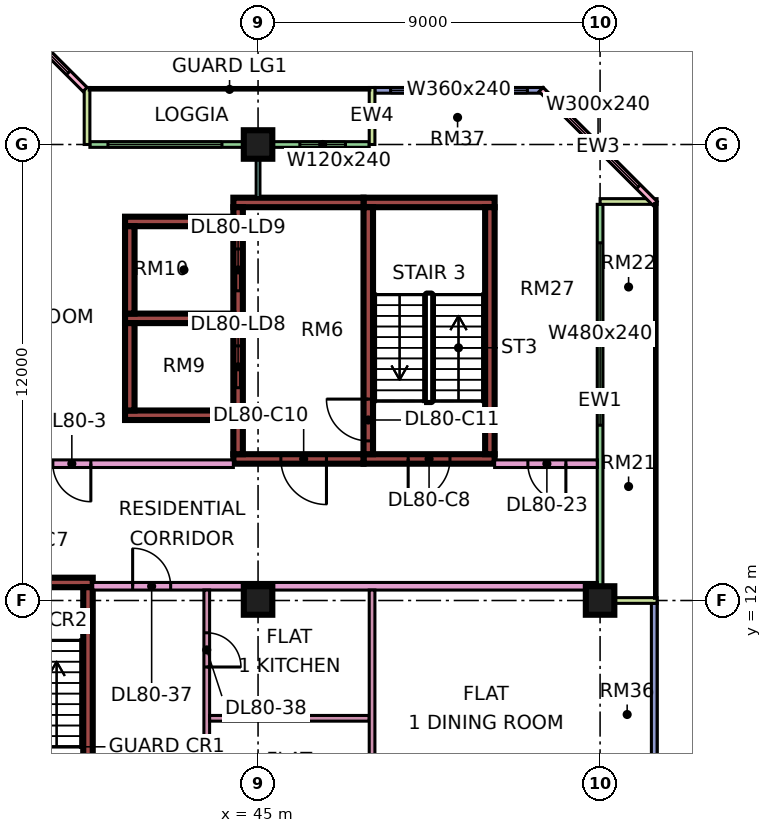
"""IFC4 building model, lengths in metres.
Left out: names, types, materials, properties, quantities, classifications, styles, units other than length and angle.
Written with IfcOpenShell. Run it as: python <this file> out.ifc"""

import sys

from ifc_helpers import new_model, si_unit, direction, frame, frame_2d, origin, origin_2d, place, context, subcontext, project, spatial, rectangle, extrude, element, fill, save


model = new_model("IFC4")
c1 = context("Model", 3, precision=1e-05, world=origin(), true_north=direction((0.0, 1.0)))
c2 = subcontext(c1, "Body", "Model", "MODEL_VIEW")
j1 = project(units=[si_unit("LENGTHUNIT", "METRE"), si_unit("PLANEANGLEUNIT", "RADIAN")], contexts=[c1])
p1 = place(None, origin())
s1 = spatial("IfcSite", under=j1, at=p1, CompositionType="ELEMENT")
p2 = place(p1, origin())
s2 = spatial("IfcBuilding", under=s1, at=p2, CompositionType="ELEMENT")
p3 = place(p2, frame((0.0, 0.0, 346.4)))
s3 = spatial("IfcBuildingStorey", under=s2, at=p3, CompositionType="ELEMENT", Elevation=346.4)
for number, where, z_axis, x_axis in (
    (1, (45.0, 12.0, 0.0), (0.0, 0.0, 1.0), (1.0, 0.0, 0.0)),
    (2, (45.0, 24.0, 0.0), (0.0, 0.0, 1.0), (1.0, 0.0, 0.0)),
    (3, (54.0, 12.0, 0.0), (0.0, 0.0, 1.0), (1.0, 0.0, 0.0)),
):
    element("IfcColumn", number, at=place(p3, frame(where, z_axis=z_axis, x_axis=x_axis)), inside=s3, PredefinedType="COLUMN", context=c2, shape_type="SweptSolid", body=[
        extrude(rectangle(XDim=0.75, YDim=0.75, at=origin_2d()), origin(), (0.0, 0.0, 1.0), 3.75),
    ])
p4 = place(p3, frame((36.375, 12.475, 0.0), z_axis=(0.0, 0.0, 1.0), x_axis=(1.0, 0.0, 0.0)))
e4 = element("IfcWall", 4, at=p4, inside=s3, PredefinedType="SHEAR", context=c2, shape_type="SweptSolid", body=[
    extrude(rectangle(XDim=4.275, YDim=0.25, at=frame_2d((2.137, 0.0))), origin(), (0.0, 0.0, 1.0), 3.75),
])
p5 = place(p4, frame((2.0, 0.0, 0.0)))
e5 = element("IfcOpeningElement", 5, at=p5, cuts=e4, PredefinedType="OPENING", context=c2, shape_type="SweptSolid", body=[
    extrude(rectangle(XDim=1.1, YDim=2.2, at=frame_2d((0.55, 1.1))), frame((0.0, 0.135, 0.0), z_axis=(0.0, -1.0, 0.0), x_axis=(1.0, 0.0, 0.0)), (0.0, 0.0, 1.0), 0.27),
])
p6 = place(p3, frame((40.525, 5.85, 0.0), z_axis=(0.0, 0.0, 1.0), x_axis=(0.0, 1.0, 0.0)))
e6 = element("IfcWall", 6, at=p6, inside=s3, PredefinedType="SHEAR", context=c2, shape_type="SweptSolid", body=[
    extrude(rectangle(XDim=6.5, YDim=0.25, at=frame_2d((3.25, 0.0))), origin(), (0.0, 0.0, 1.0), 3.75),
])
p7 = place(p3, frame((47.775, 15.725, 0.0), z_axis=(0.0, 0.0, 1.0), x_axis=(1.0, 0.0, 0.0)))
e7 = element("IfcWall", 7, at=p7, inside=s3, PredefinedType="SHEAR", context=c2, shape_type="SweptSolid", body=[
    extrude(rectangle(XDim=3.45, YDim=0.25, at=frame_2d((1.725, 0.0))), origin(), (0.0, 0.0, 1.0), 3.75),
])
p8 = place(p7, frame((1.175, 0.0, 0.0)))
e8 = element("IfcOpeningElement", 8, at=p8, cuts=e7, PredefinedType="OPENING", context=c2, shape_type="SweptSolid", body=[
    extrude(rectangle(XDim=1.1, YDim=2.2, at=frame_2d((0.55, 1.1))), frame((0.0, 0.135, 0.0), z_axis=(0.0, -1.0, 0.0), x_axis=(1.0, 0.0, 0.0)), (0.0, 0.0, 1.0), 0.27),
])
p9 = place(p3, frame((47.775, 22.475, 0.0), z_axis=(0.0, 0.0, 1.0), x_axis=(1.0, 0.0, 0.0)))
e9 = element("IfcWall", 9, at=p9, inside=s3, PredefinedType="SHEAR", context=c2, shape_type="SweptSolid", body=[
    extrude(rectangle(XDim=3.45, YDim=0.25, at=frame_2d((1.725, 0.0))), origin(), (0.0, 0.0, 1.0), 3.75),
])
p10 = place(p3, frame((47.9, 15.85, 0.0), z_axis=(0.0, 0.0, 1.0), x_axis=(0.0, 1.0, 0.0)))
e10 = element("IfcWall", 10, at=p10, inside=s3, PredefinedType="SHEAR", context=c2, shape_type="SweptSolid", body=[
    extrude(rectangle(XDim=6.5, YDim=0.25, at=frame_2d((3.25, 0.0))), origin(), (0.0, 0.0, 1.0), 3.75),
])
p11 = place(p10, frame((0.35, 0.0, 0.0)))
e11 = element("IfcOpeningElement", 11, at=p11, cuts=e10, PredefinedType="OPENING", context=c2, shape_type="SweptSolid", body=[
    extrude(rectangle(XDim=1.1, YDim=2.2, at=frame_2d((0.55, 1.1))), frame((0.0, 0.135, 0.0), z_axis=(0.0, -1.0, 0.0), x_axis=(1.0, 0.0, 0.0)), (0.0, 0.0, 1.0), 0.27),
])
p12 = place(p3, frame((51.1, 15.85, 0.0), z_axis=(0.0, 0.0, 1.0), x_axis=(0.0, 1.0, 0.0)))
e12 = element("IfcWall", 12, at=p12, inside=s3, PredefinedType="SHEAR", context=c2, shape_type="SweptSolid", body=[
    extrude(rectangle(XDim=6.5, YDim=0.25, at=frame_2d((3.25, 0.0))), origin(), (0.0, 0.0, 1.0), 3.75),
])
p13 = place(p3, frame((44.35, 15.725, 0.0), z_axis=(0.0, 0.0, 1.0), x_axis=(1.0, 0.0, 0.0)))
e13 = element("IfcWall", 13, at=p13, inside=s3, PredefinedType="SHEAR", context=c2, shape_type="SweptSolid", body=[
    extrude(rectangle(XDim=3.425, YDim=0.25, at=frame_2d((1.712, 0.0))), origin(), (0.0, 0.0, 1.0), 3.75),
])
p14 = place(p13, frame((1.25, 0.0, 0.0)))
e14 = element("IfcOpeningElement", 14, at=p14, cuts=e13, PredefinedType="OPENING", context=c2, shape_type="SweptSolid", body=[
    extrude(rectangle(XDim=1.2, YDim=2.2, at=frame_2d((0.6, 1.1))), frame((0.0, 0.135, 0.0), z_axis=(0.0, -1.0, 0.0), x_axis=(1.0, 0.0, 0.0)), (0.0, 0.0, 1.0), 0.27),
])
p15 = place(p3, frame((44.35, 22.475, 0.0), z_axis=(0.0, 0.0, 1.0), x_axis=(1.0, 0.0, 0.0)))
e15 = element("IfcWall", 15, at=p15, inside=s3, PredefinedType="SHEAR", context=c2, shape_type="SweptSolid", body=[
    extrude(rectangle(XDim=3.425, YDim=0.25, at=frame_2d((1.712, 0.0))), origin(), (0.0, 0.0, 1.0), 3.75),
])
p16 = place(p3, frame((44.475, 15.85, 0.0), z_axis=(0.0, 0.0, 1.0), x_axis=(0.0, 1.0, 0.0)))
e16 = element("IfcWall", 16, at=p16, inside=s3, PredefinedType="SHEAR", context=c2, shape_type="SweptSolid", body=[
    extrude(rectangle(XDim=6.5, YDim=0.25, at=frame_2d((3.25, 0.0))), origin(), (0.0, 0.0, 1.0), 3.75),
])
p17 = place(p16, frame((1.75, 0.0, 0.0)))
e17 = element("IfcOpeningElement", 17, at=p17, cuts=e16, PredefinedType="OPENING", context=c2, shape_type="SweptSolid", body=[
    extrude(rectangle(XDim=1.1, YDim=2.2, at=frame_2d((0.55, 1.1))), frame((0.0, 0.135, 0.0), z_axis=(0.0, -1.0, 0.0), x_axis=(1.0, 0.0, 0.0)), (0.0, 0.0, 1.0), 0.27),
])
p18 = place(p16, frame((4.3, 0.0, 0.0)))
e18 = element("IfcOpeningElement", 18, at=p18, cuts=e16, PredefinedType="OPENING", context=c2, shape_type="SweptSolid", body=[
    extrude(rectangle(XDim=1.1, YDim=2.2, at=frame_2d((0.55, 1.1))), frame((0.0, 0.135, 0.0), z_axis=(0.0, -1.0, 0.0), x_axis=(1.0, 0.0, 0.0)), (0.0, 0.0, 1.0), 0.27),
])
for number, where, z_axis, x_axis in (
    (19, (41.5, 16.875, 0.0), (0.0, 0.0, 1.0), (1.0, 0.0, 0.0)),
    (20, (41.5, 19.425, 0.0), (0.0, 0.0, 1.0), (1.0, 0.0, 0.0)),
    (21, (41.5, 21.975, 0.0), (0.0, 0.0, 1.0), (1.0, 0.0, 0.0)),
):
    element("IfcWall", number, at=place(p3, frame(where, z_axis=z_axis, x_axis=x_axis)), inside=s3, PredefinedType="SHEAR", context=c2, shape_type="SweptSolid", body=[
        extrude(rectangle(XDim=2.85, YDim=0.25, at=frame_2d((1.425, 0.0))), origin(), (0.0, 0.0, 1.0), 3.75),
    ])
for number, where, z_axis, x_axis in (
    (22, (41.625, 17.0, 0.0), (0.0, 0.0, 1.0), (0.0, 1.0, 0.0)),
    (23, (41.625, 19.55, 0.0), (0.0, 0.0, 1.0), (0.0, 1.0, 0.0)),
):
    element("IfcWall", number, at=place(p3, frame(where, z_axis=z_axis, x_axis=x_axis)), inside=s3, PredefinedType="SHEAR", context=c2, shape_type="SweptSolid", body=[
        extrude(rectangle(XDim=2.3, YDim=0.25, at=frame_2d((1.15, 0.0))), origin(), (0.0, 0.0, 1.0), 3.75),
    ])
p19 = place(p3, frame((52.5, 25.425, 0.0), z_axis=(0.0, 0.0, 1.0), x_axis=(-1.0, 0.0, 0.0)))
e24 = element("IfcWall", 24, at=p19, inside=s3, PredefinedType="SOLIDWALL", context=c2, shape_type="SweptSolid", body=[
    extrude(rectangle(XDim=4.425, YDim=0.15, at=frame_2d((2.212, 0.0))), origin(), (0.0, 0.0, 1.0), 3.35),
])
p20 = place(p19, frame((0.413, 0.0, 0.45)))
e25 = element("IfcOpeningElement", 25, at=p20, cuts=e24, PredefinedType="OPENING", context=c2, shape_type="SweptSolid", body=[
    extrude(rectangle(XDim=3.6, YDim=2.4, at=frame_2d((1.8, 1.2))), frame((0.0, 0.085, 0.0), z_axis=(0.0, -1.0, 0.0), x_axis=(1.0, 0.0, 0.0)), (0.0, 0.0, 1.0), 0.17),
])
p21 = place(p3, frame((47.925, 24.0, 0.0), z_axis=(0.0, 0.0, 1.0), x_axis=(-1.0, 0.0, 0.0)))
e26 = element("IfcWall", 26, at=p21, inside=s3, PredefinedType="SOLIDWALL", context=c2, shape_type="SweptSolid", body=[
    extrude(rectangle(XDim=7.35, YDim=0.15, at=frame_2d((3.675, 0.0))), origin(), (0.0, 0.0, 1.0), 3.35),
])
p22 = place(p21, frame((0.625, 0.0, 0.45)))
e27 = element("IfcOpeningElement", 27, at=p22, cuts=e26, PredefinedType="OPENING", context=c2, shape_type="SweptSolid", body=[
    extrude(rectangle(XDim=1.2, YDim=2.4, at=frame_2d((0.6, 1.2))), frame((0.0, 0.085, 0.0), z_axis=(0.0, -1.0, 0.0), x_axis=(1.0, 0.0, 0.0)), (0.0, 0.0, 1.0), 0.17),
])
p23 = place(p21, frame((3.875, 0.0, 0.45)))
e28 = element("IfcOpeningElement", 28, at=p23, cuts=e26, PredefinedType="OPENING", context=c2, shape_type="SweptSolid", body=[
    extrude(rectangle(XDim=3.0, YDim=2.4, at=frame_2d((1.5, 1.2))), frame((0.0, 0.085, 0.0), z_axis=(0.0, -1.0, 0.0), x_axis=(1.0, 0.0, 0.0)), (0.0, 0.0, 1.0), 0.17),
])
for number, where, z_axis, x_axis in (
    (29, (48.0, 25.5, 0.0), (0.0, 0.0, 1.0), (0.0, -1.0, 0.0)),
    (30, (40.5, 25.5, 0.0), (0.0, 0.0, 1.0), (0.0, -1.0, 0.0)),
):
    element("IfcWall", number, at=place(p3, frame(where, z_axis=z_axis, x_axis=x_axis)), inside=s3, PredefinedType="SOLIDWALL", context=c2, shape_type="SweptSolid", body=[
        extrude(rectangle(XDim=1.5, YDim=0.15, at=frame_2d((0.75, 0.0))), origin(), (0.0, 0.0, 1.0), 3.35),
    ])
p24 = place(p3, frame((40.447, 25.447, 0.0), z_axis=(0.0, 0.0, 1.0), x_axis=(-0.707106781187, 0.707106781187, 0.0)))
e31 = element("IfcWall", 31, at=p24, inside=s3, PredefinedType="SOLIDWALL", context=c2, shape_type="SweptSolid", body=[
    extrude(rectangle(XDim=4.243, YDim=0.15, at=frame_2d((2.121, 0.0))), origin(), (0.0, 0.0, 1.0), 3.35),
])
p25 = place(p24, frame((0.621, 0.0, 0.45)))
e32 = element("IfcOpeningElement", 32, at=p25, cuts=e31, PredefinedType="OPENING", context=c2, shape_type="SweptSolid", body=[
    extrude(rectangle(XDim=3.0, YDim=2.4, at=frame_2d((1.5, 1.2))), frame((0.0, 0.085, 0.0), z_axis=(0.0, -1.0, 0.0), x_axis=(1.0, 0.0, 0.0)), (0.0, 0.0, 1.0), 0.17),
])
p26 = place(p3, frame((55.425, 1.5, 0.0), z_axis=(0.0, 0.0, 1.0), x_axis=(0.0, 1.0, 0.0)))
e33 = element("IfcWall", 33, at=p26, inside=s3, PredefinedType="SOLIDWALL", context=c2, shape_type="SweptSolid", body=[
    extrude(rectangle(XDim=10.425, YDim=0.15, at=frame_2d((5.212, 0.0))), origin(), (0.0, 0.0, 1.0), 3.35),
])
p27 = place(p26, frame((0.4, 0.0, 0.45)))
e34 = element("IfcOpeningElement", 34, at=p27, cuts=e33, PredefinedType="OPENING", context=c2, shape_type="SweptSolid", body=[
    extrude(rectangle(XDim=2.4, YDim=2.4, at=frame_2d((1.2, 1.2))), frame((0.0, 0.085, 0.0), z_axis=(0.0, -1.0, 0.0), x_axis=(1.0, 0.0, 0.0)), (0.0, 0.0, 1.0), 0.17),
])
p28 = place(p3, frame((54.0, 12.075, 0.0), z_axis=(0.0, 0.0, 1.0), x_axis=(0.0, 1.0, 0.0)))
e35 = element("IfcWall", 35, at=p28, inside=s3, PredefinedType="SOLIDWALL", context=c2, shape_type="SweptSolid", body=[
    extrude(rectangle(XDim=10.35, YDim=0.15, at=frame_2d((5.175, 0.0))), origin(), (0.0, 0.0, 1.0), 3.35),
])
p29 = place(p28, frame((4.538, 0.0, 0.45)))
e36 = element("IfcOpeningElement", 36, at=p29, cuts=e35, PredefinedType="OPENING", context=c2, shape_type="SweptSolid", body=[
    extrude(rectangle(XDim=4.8, YDim=2.4, at=frame_2d((2.4, 1.2))), frame((0.0, 0.085, 0.0), z_axis=(0.0, -1.0, 0.0), x_axis=(1.0, 0.0, 0.0)), (0.0, 0.0, 1.0), 0.17),
])
for number, where, z_axis, x_axis in (
    (37, (55.5, 12.0, 0.0), (0.0, 0.0, 1.0), (-1.0, 0.0, 0.0)),
    (38, (55.5, 22.5, 0.0), (0.0, 0.0, 1.0), (-1.0, 0.0, 0.0)),
):
    element("IfcWall", number, at=place(p3, frame(where, z_axis=z_axis, x_axis=x_axis)), inside=s3, PredefinedType="SOLIDWALL", context=c2, shape_type="SweptSolid", body=[
        extrude(rectangle(XDim=1.5, YDim=0.15, at=frame_2d((0.75, 0.0))), origin(), (0.0, 0.0, 1.0), 3.35),
    ])
p30 = place(p3, frame((55.447, 22.447, 0.0), z_axis=(0.0, 0.0, 1.0), x_axis=(-0.707106781187, 0.707106781187, 0.0)))
e39 = element("IfcWall", 39, at=p30, inside=s3, PredefinedType="SOLIDWALL", context=c2, shape_type="SweptSolid", body=[
    extrude(rectangle(XDim=4.243, YDim=0.15, at=frame_2d((2.121, 0.0))), origin(), (0.0, 0.0, 1.0), 3.35),
])
p31 = place(p30, frame((0.621, 0.0, 0.45)))
e40 = element("IfcOpeningElement", 40, at=p31, cuts=e39, PredefinedType="OPENING", context=c2, shape_type="SweptSolid", body=[
    extrude(rectangle(XDim=3.0, YDim=2.4, at=frame_2d((1.5, 1.2))), frame((0.0, 0.085, 0.0), z_axis=(0.0, -1.0, 0.0), x_axis=(1.0, 0.0, 0.0)), (0.0, 0.0, 1.0), 0.17),
])
p32 = place(p3, frame((34.0, 15.6, 0.0), z_axis=(0.0, 0.0, 1.0), x_axis=(1.0, 0.0, 0.0)))
e41 = element("IfcWall", 41, at=p32, inside=s3, PredefinedType="PARTITIONING", context=c2, shape_type="SweptSolid", body=[
    extrude(rectangle(XDim=10.35, YDim=0.2, at=frame_2d((5.175, 0.0))), origin(), (0.0, 0.0, 1.0), 3.35),
])
p33 = place(p32, frame((5.6, 0.0, 0.0)))
e42 = element("IfcOpeningElement", 42, at=p33, cuts=e41, PredefinedType="OPENING", context=c2, shape_type="SweptSolid", body=[
    extrude(rectangle(XDim=1.0, YDim=2.1, at=frame_2d((0.5, 1.05))), frame((0.0, 0.11, 0.0), z_axis=(0.0, -1.0, 0.0), x_axis=(1.0, 0.0, 0.0)), (0.0, 0.0, 1.0), 0.22),
])
p34 = place(p32, frame((0.45, 0.0, 0.0)))
e43 = element("IfcOpeningElement", 43, at=p34, cuts=e41, PredefinedType="OPENING", context=c2, shape_type="SweptSolid", body=[
    extrude(rectangle(XDim=1.2, YDim=2.1, at=frame_2d((0.6, 1.05))), frame((0.0, 0.11, 0.0), z_axis=(0.0, -1.0, 0.0), x_axis=(1.0, 0.0, 0.0)), (0.0, 0.0, 1.0), 0.22),
])
p35 = place(p3, frame((40.65, 12.375, 0.0), z_axis=(0.0, 0.0, 1.0), x_axis=(1.0, 0.0, 0.0)))
e44 = element("IfcWall", 44, at=p35, inside=s3, PredefinedType="PARTITIONING", context=c2, shape_type="SweptSolid", body=[
    extrude(rectangle(XDim=13.276, YDim=0.2, at=frame_2d((6.638, 0.0))), origin(), (0.0, 0.0, 1.0), 3.35),
])
p36 = place(p35, frame((1.05, 0.0, 0.0)))
e45 = element("IfcOpeningElement", 45, at=p36, cuts=e44, PredefinedType="OPENING", context=c2, shape_type="SweptSolid", body=[
    extrude(rectangle(XDim=1.0, YDim=2.1, at=frame_2d((0.5, 1.05))), frame((0.0, 0.11, 0.0), z_axis=(0.0, -1.0, 0.0), x_axis=(1.0, 0.0, 0.0)), (0.0, 0.0, 1.0), 0.22),
])
p37 = place(p3, frame((43.65, 5.975, 0.0), z_axis=(0.0, 0.0, 1.0), x_axis=(0.0, 1.0, 0.0)))
e46 = element("IfcWall", 46, at=p37, inside=s3, PredefinedType="PARTITIONING", context=c2, shape_type="SweptSolid", body=[
    extrude(rectangle(XDim=6.3, YDim=0.15, at=frame_2d((3.15, 0.0))), origin(), (0.0, 0.0, 1.0), 3.35),
])
p38 = place(p37, frame((4.275, 0.0, 0.0)))
e47 = element("IfcOpeningElement", 47, at=p38, cuts=e46, PredefinedType="OPENING", context=c2, shape_type="SweptSolid", body=[
    extrude(rectangle(XDim=0.9, YDim=2.1, at=frame_2d((0.45, 1.05))), frame((0.0, 0.085, 0.0), z_axis=(0.0, -1.0, 0.0), x_axis=(1.0, 0.0, 0.0)), (0.0, 0.0, 1.0), 0.17),
])
p39 = place(p3, frame((43.725, 8.9, 0.0), z_axis=(0.0, 0.0, 1.0), x_axis=(1.0, 0.0, 0.0)))
e48 = element("IfcWall", 48, at=p39, inside=s3, PredefinedType="PARTITIONING", context=c2, shape_type="SweptSolid", body=[
    extrude(rectangle(XDim=4.2, YDim=0.15, at=frame_2d((2.1, 0.0))), origin(), (0.0, 0.0, 1.0), 3.35),
])
p40 = place(p3, frame((45.0, 22.6, 0.0), z_axis=(0.0, 0.0, 1.0), x_axis=(0.0, 1.0, 0.0)))
e49 = element("IfcWall", 49, at=p40, inside=s3, PredefinedType="PARTITIONING", context=c2, shape_type="SweptSolid", body=[
    extrude(rectangle(XDim=1.326, YDim=0.1, at=frame_2d((0.663, 0.0))), origin(), (0.0, 0.0, 1.0), 3.35),
])
p41 = place(p3, frame((48.0, 5.975, 0.0), z_axis=(0.0, 0.0, 1.0), x_axis=(0.0, 1.0, 0.0)))
e50 = element("IfcWall", 50, at=p41, inside=s3, PredefinedType="PARTITIONING", context=c2, shape_type="SweptSolid", body=[
    extrude(rectangle(XDim=6.3, YDim=0.15, at=frame_2d((3.15, 0.0))), origin(), (0.0, 0.0, 1.0), 3.35),
])
p42 = place(p3, frame((51.225, 15.6, 0.0), z_axis=(0.0, 0.0, 1.0), x_axis=(1.0, 0.0, 0.0)))
e51 = element("IfcWall", 51, at=p42, inside=s3, PredefinedType="PARTITIONING", context=c2, shape_type="SweptSolid", body=[
    extrude(rectangle(XDim=2.701, YDim=0.2, at=frame_2d((1.351, 0.0))), origin(), (0.0, 0.0, 1.0), 3.35),
])
p43 = place(p42, frame((0.875, 0.0, 0.0)))
e52 = element("IfcOpeningElement", 52, at=p43, cuts=e51, PredefinedType="OPENING", context=c2, shape_type="SweptSolid", body=[
    extrude(rectangle(XDim=1.0, YDim=2.1, at=frame_2d((0.5, 1.05))), frame((0.0, 0.11, 0.0), z_axis=(0.0, -1.0, 0.0), x_axis=(1.0, 0.0, 0.0)), (0.0, 0.0, 1.0), 0.22),
])
p44 = place(p20, origin())
e53 = element("IfcWindow", 53, at=p44, inside=s3, PartitioningType="SINGLE_PANEL", PredefinedType="WINDOW", context=c2, shape_type="SweptSolid", body=[
    extrude(rectangle(XDim=3.6, YDim=2.4, at=frame_2d((1.8, 1.2))), frame((0.0, 0.03, 0.0), z_axis=(0.0, -1.0, 0.0), x_axis=(1.0, 0.0, 0.0)), (0.0, 0.0, 1.0), 0.06),
])
fill(e25, e53)
p45 = place(p22, origin())
e54 = element("IfcWindow", 54, at=p45, inside=s3, PartitioningType="SINGLE_PANEL", PredefinedType="WINDOW", context=c2, shape_type="SweptSolid", body=[
    extrude(rectangle(XDim=1.2, YDim=2.4, at=frame_2d((0.6, 1.2))), frame((0.0, 0.03, 0.0), z_axis=(0.0, -1.0, 0.0), x_axis=(1.0, 0.0, 0.0)), (0.0, 0.0, 1.0), 0.06),
])
fill(e27, e54)
p46 = place(p23, origin())
e55 = element("IfcWindow", 55, at=p46, inside=s3, PartitioningType="SINGLE_PANEL", PredefinedType="WINDOW", context=c2, shape_type="SweptSolid", body=[
    extrude(rectangle(XDim=3.0, YDim=2.4, at=frame_2d((1.5, 1.2))), frame((0.0, 0.03, 0.0), z_axis=(0.0, -1.0, 0.0), x_axis=(1.0, 0.0, 0.0)), (0.0, 0.0, 1.0), 0.06),
])
fill(e28, e55)
p47 = place(p25, origin())
e56 = element("IfcWindow", 56, at=p47, inside=s3, PartitioningType="SINGLE_PANEL", PredefinedType="WINDOW", context=c2, shape_type="SweptSolid", body=[
    extrude(rectangle(XDim=3.0, YDim=2.4, at=frame_2d((1.5, 1.2))), frame((0.0, 0.03, 0.0), z_axis=(0.0, -1.0, 0.0), x_axis=(1.0, 0.0, 0.0)), (0.0, 0.0, 1.0), 0.06),
])
fill(e32, e56)
p48 = place(p29, origin())
e57 = element("IfcWindow", 57, at=p48, inside=s3, PartitioningType="SINGLE_PANEL", PredefinedType="WINDOW", context=c2, shape_type="SweptSolid", body=[
    extrude(rectangle(XDim=4.8, YDim=2.4, at=frame_2d((2.4, 1.2))), frame((0.0, 0.03, 0.0), z_axis=(0.0, -1.0, 0.0), x_axis=(1.0, 0.0, 0.0)), (0.0, 0.0, 1.0), 0.06),
])
fill(e36, e57)
p49 = place(p31, origin())
e58 = element("IfcWindow", 58, at=p49, inside=s3, PartitioningType="SINGLE_PANEL", PredefinedType="WINDOW", context=c2, shape_type="SweptSolid", body=[
    extrude(rectangle(XDim=3.0, YDim=2.4, at=frame_2d((1.5, 1.2))), frame((0.0, 0.03, 0.0), z_axis=(0.0, -1.0, 0.0), x_axis=(1.0, 0.0, 0.0)), (0.0, 0.0, 1.0), 0.06),
])
fill(e40, e58)
p50 = place(p8, frame((1.1, 0.0, 0.0), z_axis=(0.0, 0.0, 1.0), x_axis=(-1.0, 0.0, 0.0)))
e59 = element("IfcDoor", 59, at=p50, inside=s3, OperationType="SINGLE_SWING_LEFT", PredefinedType="DOOR", context=c2, shape_type="SweptSolid", body=[
    extrude(rectangle(XDim=1.1, YDim=2.2, at=frame_2d((0.55, 1.1))), frame((0.0, 0.025, 0.0), z_axis=(0.0, -1.0, 0.0), x_axis=(1.0, 0.0, 0.0)), (0.0, 0.0, 1.0), 0.05),
])
fill(e8, e59)
p51 = place(p14, origin())
e60 = element("IfcDoor", 60, at=p51, inside=s3, OperationType="SINGLE_SWING_RIGHT", PredefinedType="DOOR", context=c2, shape_type="SweptSolid", body=[
    extrude(rectangle(XDim=1.2, YDim=2.2, at=frame_2d((0.6, 1.1))), frame((0.0, 0.025, 0.0), z_axis=(0.0, -1.0, 0.0), x_axis=(1.0, 0.0, 0.0)), (0.0, 0.0, 1.0), 0.05),
])
fill(e14, e60)
p52 = place(p11, frame((1.1, 0.0, 0.0), z_axis=(0.0, 0.0, 1.0), x_axis=(-1.0, 0.0, 0.0)))
e61 = element("IfcDoor", 61, at=p52, inside=s3, OperationType="SINGLE_SWING_RIGHT", PredefinedType="DOOR", context=c2, shape_type="SweptSolid", body=[
    extrude(rectangle(XDim=1.1, YDim=2.2, at=frame_2d((0.55, 1.1))), frame((0.0, 0.025, 0.0), z_axis=(0.0, -1.0, 0.0), x_axis=(1.0, 0.0, 0.0)), (0.0, 0.0, 1.0), 0.05),
])
fill(e11, e61)
p53 = place(p17, origin())
e62 = element("IfcDoor", 62, at=p53, inside=s3, OperationType="DOUBLE_DOOR_SLIDING", PredefinedType="DOOR", context=c2, shape_type="SweptSolid", body=[
    extrude(rectangle(XDim=1.1, YDim=2.2, at=frame_2d((0.55, 1.1))), frame((0.0, 0.025, 0.0), z_axis=(0.0, -1.0, 0.0), x_axis=(1.0, 0.0, 0.0)), (0.0, 0.0, 1.0), 0.05),
])
fill(e17, e62)
p54 = place(p18, origin())
e63 = element("IfcDoor", 63, at=p54, inside=s3, OperationType="DOUBLE_DOOR_SLIDING", PredefinedType="DOOR", context=c2, shape_type="SweptSolid", body=[
    extrude(rectangle(XDim=1.1, YDim=2.2, at=frame_2d((0.55, 1.1))), frame((0.0, 0.025, 0.0), z_axis=(0.0, -1.0, 0.0), x_axis=(1.0, 0.0, 0.0)), (0.0, 0.0, 1.0), 0.05),
])
fill(e18, e63)
p55 = place(p33, origin())
e64 = element("IfcDoor", 64, at=p55, inside=s3, OperationType="SINGLE_SWING_RIGHT", PredefinedType="DOOR", context=c2, shape_type="SweptSolid", body=[
    extrude(rectangle(XDim=1.0, YDim=2.1, at=frame_2d((0.5, 1.05))), frame((0.0, 0.025, 0.0), z_axis=(0.0, -1.0, 0.0), x_axis=(1.0, 0.0, 0.0)), (0.0, 0.0, 1.0), 0.05),
])
fill(e42, e64)
p56 = place(p43, origin())
e65 = element("IfcDoor", 65, at=p56, inside=s3, OperationType="SINGLE_SWING_RIGHT", PredefinedType="DOOR", context=c2, shape_type="SweptSolid", body=[
    extrude(rectangle(XDim=1.0, YDim=2.1, at=frame_2d((0.5, 1.05))), frame((0.0, 0.025, 0.0), z_axis=(0.0, -1.0, 0.0), x_axis=(1.0, 0.0, 0.0)), (0.0, 0.0, 1.0), 0.05),
])
fill(e52, e65)
p57 = place(p36, origin())
e66 = element("IfcDoor", 66, at=p57, inside=s3, OperationType="SINGLE_SWING_LEFT", PredefinedType="DOOR", context=c2, shape_type="SweptSolid", body=[
    extrude(rectangle(XDim=1.0, YDim=2.1, at=frame_2d((0.5, 1.05))), frame((0.0, 0.025, 0.0), z_axis=(0.0, -1.0, 0.0), x_axis=(1.0, 0.0, 0.0)), (0.0, 0.0, 1.0), 0.05),
])
fill(e45, e66)
p58 = place(p38, frame((0.9, 0.0, 0.0), z_axis=(0.0, 0.0, 1.0), x_axis=(-1.0, 0.0, 0.0)))
e67 = element("IfcDoor", 67, at=p58, inside=s3, OperationType="SINGLE_SWING_LEFT", PredefinedType="DOOR", context=c2, shape_type="SweptSolid", body=[
    extrude(rectangle(XDim=0.9, YDim=2.1, at=frame_2d((0.45, 1.05))), frame((0.0, 0.025, 0.0), z_axis=(0.0, -1.0, 0.0), x_axis=(1.0, 0.0, 0.0)), (0.0, 0.0, 1.0), 0.05),
])
fill(e47, e67)
save(model, sys.argv[1])
